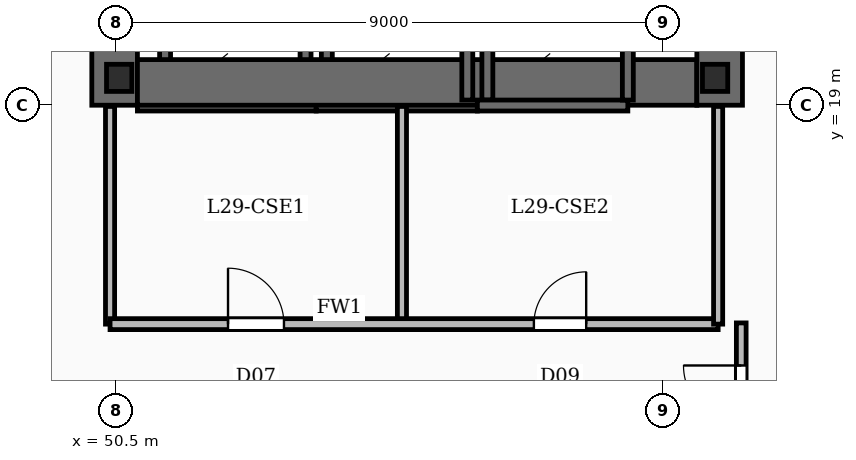
"""IFC4 building model, lengths in metres.
Left out: names, types, materials, properties, quantities, classifications, styles, units other than length and angle.
Written with IfcOpenShell. Run it as: python <this file> out.ifc"""

import sys

from ifc_helpers import new_model, si_unit, direction, frame, frame_2d, origin, origin_2d, place, context, subcontext, project, spatial, rectangle, i_section, extrude, element, fill, save


model = new_model("IFC4")
c1 = context("Model", 3, precision=1e-05, world=origin(), true_north=direction((0.0, 1.0)))
c2 = subcontext(c1, "Body", "Model", "MODEL_VIEW")
j1 = project(units=[si_unit("LENGTHUNIT", "METRE"), si_unit("PLANEANGLEUNIT", "RADIAN")], contexts=[c1])
p1 = place(None, origin())
s1 = spatial("IfcSite", under=j1, at=p1, CompositionType="ELEMENT")
p2 = place(p1, origin())
s2 = spatial("IfcBuilding", under=s1, at=p2, CompositionType="ELEMENT")
p3 = place(p2, frame((0.0, 0.0, 125.95)))
s3 = spatial("IfcBuildingStorey", under=s2, at=p3, CompositionType="ELEMENT", Elevation=125.95)
p4 = place(p3, frame((50.475, 19.0, -0.31), z_axis=(0.0, 0.0, 1.0), x_axis=(0.0, 1.0, 0.0)))
e1 = element("IfcWall", 1, at=p4, inside=s3, PredefinedType="SHEAR", context=c2, shape_type="SweptSolid", body=[
    extrude(rectangle(XDim=20.8, YDim=0.75, at=frame_2d((10.4, 0.0))), origin(), (0.0, 0.0, 1.0), 4.84),
])
p5 = place(p4, frame((2.5, 0.0, 0.31)))
e2 = element("IfcOpeningElement", 2, at=p5, cuts=e1, PredefinedType="OPENING", context=c2, shape_type="SweptSolid", body=[
    extrude(rectangle(XDim=1.05, YDim=2.15, at=frame_2d((0.525, 1.075))), frame((0.0, 0.385, 0.0), z_axis=(0.0, -1.0, 0.0), x_axis=(1.0, 0.0, 0.0)), (0.0, 0.0, 1.0), 0.77),
])
p6 = place(p4, frame((8.65, 0.0, 0.31)))
e3 = element("IfcOpeningElement", 3, at=p6, cuts=e1, PredefinedType="OPENING", context=c2, shape_type="SweptSolid", body=[
    extrude(rectangle(XDim=1.05, YDim=2.15, at=frame_2d((0.525, 1.075))), frame((0.0, 0.385, 0.0), z_axis=(0.0, -1.0, 0.0), x_axis=(1.0, 0.0, 0.0)), (0.0, 0.0, 1.0), 0.77),
])
p7 = place(p4, frame((14.62, 0.0, 0.31)))
e4 = element("IfcOpeningElement", 4, at=p7, cuts=e1, PredefinedType="OPENING", context=c2, shape_type="SweptSolid", body=[
    extrude(rectangle(XDim=1.1, YDim=2.15, at=frame_2d((0.55, 1.075))), frame((0.0, 0.385, 0.0), z_axis=(0.0, -1.0, 0.0), x_axis=(1.0, 0.0, 0.0)), (0.0, 0.0, 1.0), 0.77),
])
p8 = place(p3, frame((60.425, 19.0, -0.31), z_axis=(0.0, 0.0, 1.0), x_axis=(0.0, 1.0, 0.0)))
e5 = element("IfcWall", 5, at=p8, inside=s3, PredefinedType="SHEAR", context=c2, shape_type="SweptSolid", body=[
    extrude(rectangle(XDim=20.8, YDim=0.75, at=frame_2d((10.4, 0.0))), origin(), (0.0, 0.0, 1.0), 4.84),
])
p9 = place(p3, frame((50.85, 19.375, -0.31), z_axis=(0.0, 0.0, 1.0), x_axis=(1.0, 0.0, 0.0)))
e6 = element("IfcWall", 6, at=p9, inside=s3, PredefinedType="SHEAR", context=c2, shape_type="SweptSolid", body=[
    extrude(rectangle(XDim=9.2, YDim=0.75, at=frame_2d((4.6, 0.0))), origin(), (0.0, 0.0, 1.0), 4.84),
])
for number, where, z_axis, x_axis in (
    (7, (50.55, 19.45, -0.31), (0.0, 0.0, 1.0), (1.0, 0.0, 0.0)),
    (8, (60.35, 19.45, -0.31), (0.0, 0.0, 1.0), (1.0, 0.0, 0.0)),
):
    element("IfcColumn", number, at=place(p3, frame(where, z_axis=z_axis, x_axis=x_axis)), inside=s3, PredefinedType="COLUMN", context=c2, shape_type="SweptSolid", body=[
        extrude(i_section(OverallWidth=0.416, OverallDepth=0.446, WebThickness=0.039, FlangeThickness=0.063, FilletRadius=0.02, at=origin_2d()), origin(), (0.0, 0.0, 1.0), 4.84),
    ])
p10 = place(p3, frame((50.85, 18.995, 0.0), z_axis=(0.0, 0.0, 1.0), x_axis=(1.0, 0.0, 0.0)))
e9 = element("IfcWall", 9, at=p10, inside=s3, PredefinedType="SOLIDWALL", context=c2, shape_type="SweptSolid", body=[
    extrude(rectangle(XDim=2.94, YDim=0.18, at=frame_2d((1.47, 0.0))), origin(), (0.0, 0.0, 1.0), 4.53),
])
for number, where, z_axis, x_axis in (
    (10, (51.305, 19.085, 0.0), (0.0, 0.0, 1.0), (0.0, 1.0, 0.0)),
    (11, (53.615, 19.085, 0.0), (0.0, 0.0, 1.0), (0.0, 1.0, 0.0)),
):
    element("IfcWall", number, at=place(p3, frame(where, z_axis=z_axis, x_axis=x_axis)), inside=s3, PredefinedType="SOLIDWALL", context=c2, shape_type="SweptSolid", body=[
        extrude(rectangle(XDim=1.73, YDim=0.18, at=frame_2d((0.865, 0.0))), origin(), (0.0, 0.0, 1.0), 4.53),
    ])
p11 = place(p3, frame((53.79, 18.995, 0.0), z_axis=(0.0, 0.0, 1.0), x_axis=(1.0, 0.0, 0.0)))
e12 = element("IfcWall", 12, at=p11, inside=s3, PredefinedType="SOLIDWALL", context=c2, shape_type="SweptSolid", body=[
    extrude(rectangle(XDim=2.65, YDim=0.18, at=frame_2d((1.325, 0.0))), origin(), (0.0, 0.0, 1.0), 4.53),
])
for number, where, z_axis, x_axis in (
    (13, (53.965, 19.085, 0.0), (0.0, 0.0, 1.0), (0.0, 1.0, 0.0)),
    (14, (56.275, 19.085, 0.0), (0.0, 0.0, 1.0), (0.0, 1.0, 0.0)),
):
    element("IfcWall", number, at=place(p3, frame(where, z_axis=z_axis, x_axis=x_axis)), inside=s3, PredefinedType="SOLIDWALL", context=c2, shape_type="SweptSolid", body=[
        extrude(rectangle(XDim=1.73, YDim=0.18, at=frame_2d((0.865, 0.0))), origin(), (0.0, 0.0, 1.0), 4.53),
    ])
p12 = place(p3, frame((56.44, 18.995, 0.0), z_axis=(0.0, 0.0, 1.0), x_axis=(1.0, 0.0, 0.0)))
e15 = element("IfcWall", 15, at=p12, inside=s3, PredefinedType="SOLIDWALL", context=c2, shape_type="SweptSolid", body=[
    extrude(rectangle(XDim=2.475, YDim=0.18, at=frame_2d((1.238, 0.0))), origin(), (0.0, 0.0, 1.0), 4.53),
])
for number, where, z_axis, x_axis in (
    (16, (56.605, 19.085, 0.0), (0.0, 0.0, 1.0), (0.0, 1.0, 0.0)),
    (17, (58.915, 19.085, 0.0), (0.0, 0.0, 1.0), (0.0, 1.0, 0.0)),
):
    element("IfcWall", number, at=place(p3, frame(where, z_axis=z_axis, x_axis=x_axis)), inside=s3, PredefinedType="SOLIDWALL", context=c2, shape_type="SweptSolid", body=[
        extrude(rectangle(XDim=1.73, YDim=0.18, at=frame_2d((0.865, 0.0))), origin(), (0.0, 0.0, 1.0), 4.53),
    ])
p13 = place(p3, frame((55.2, 15.4, 0.0), z_axis=(0.0, 0.0, 1.0), x_axis=(0.0, 1.0, 0.0)))
e18 = element("IfcWall", 18, at=p13, inside=s3, PredefinedType="PARTITIONING", context=c2, shape_type="SweptSolid", body=[
    extrude(rectangle(XDim=3.58, YDim=0.15, at=frame_2d((1.79, 0.0))), origin(), (0.0, 0.0, 1.0), 3.59),
])
p14 = place(p3, frame((50.4, 15.4, 0.0), z_axis=(0.0, 0.0, 1.0), x_axis=(1.0, 0.0, 0.0)))
e19 = element("IfcWall", 19, at=p14, inside=s3, PredefinedType="SOLIDWALL", context=c2, shape_type="SweptSolid", body=[
    extrude(rectangle(XDim=10.0, YDim=0.18, at=frame_2d((5.0, 0.0))), origin(), (0.0, 0.0, 1.0), 3.59),
])
p15 = place(p14, frame((1.94, 0.0, 0.0)))
e20 = element("IfcOpeningElement", 20, at=p15, cuts=e19, PredefinedType="OPENING", context=c2, shape_type="SweptSolid", body=[
    extrude(rectangle(XDim=0.92, YDim=2.1, at=frame_2d((0.46, 1.05))), frame((0.0, 0.1, 0.0), z_axis=(0.0, -1.0, 0.0), x_axis=(1.0, 0.0, 0.0)), (0.0, 0.0, 1.0), 0.2),
])
p16 = place(p14, frame((6.97, 0.0, 0.0)))
e21 = element("IfcOpeningElement", 21, at=p16, cuts=e19, PredefinedType="OPENING", context=c2, shape_type="SweptSolid", body=[
    extrude(rectangle(XDim=0.86, YDim=2.05, at=frame_2d((0.43, 1.025))), frame((0.0, 0.1, 0.0), z_axis=(0.0, -1.0, 0.0), x_axis=(1.0, 0.0, 0.0)), (0.0, 0.0, 1.0), 0.2),
])
for number, where, z_axis, x_axis in (
    (22, (50.4, 15.4, 0.0), (0.0, 0.0, 1.0), (0.0, 1.0, 0.0)),
    (23, (60.4, 15.4, 0.0), (0.0, 0.0, 1.0), (0.0, 1.0, 0.0)),
):
    element("IfcWall", number, at=place(p3, frame(where, z_axis=z_axis, x_axis=x_axis)), inside=s3, PredefinedType="PARTITIONING", context=c2, shape_type="SweptSolid", body=[
        extrude(rectangle(XDim=3.58, YDim=0.15, at=frame_2d((1.79, 0.0))), origin(), (0.0, 0.0, 1.0), 3.59),
    ])
p17 = place(p3, frame((60.78, 13.12, 0.0), z_axis=(0.0, 0.0, 1.0), x_axis=(0.0, 1.0, 0.0)))
e24 = element("IfcWall", 24, at=p17, inside=s3, PredefinedType="PARTITIONING", context=c2, shape_type="SweptSolid", body=[
    extrude(rectangle(XDim=2.3, YDim=0.16, at=frame_2d((1.15, 0.0))), origin(), (0.0, 0.0, 1.0), 3.59),
])
p18 = place(p17, frame((0.65, 0.0, 0.0)))
e25 = element("IfcOpeningElement", 25, at=p18, cuts=e24, PredefinedType="OPENING", context=c2, shape_type="SweptSolid", body=[
    extrude(rectangle(XDim=0.95, YDim=2.15, at=frame_2d((0.475, 1.075))), frame((0.0, 0.09, 0.0), z_axis=(0.0, -1.0, 0.0), x_axis=(1.0, 0.0, 0.0)), (0.0, 0.0, 1.0), 0.18),
])
p19 = place(p15, origin())
e26 = element("IfcDoor", 26, at=p19, inside=s3, OperationType="SINGLE_SWING_LEFT", PredefinedType="DOOR", context=c2, shape_type="SweptSolid", body=[
    extrude(rectangle(XDim=0.92, YDim=2.1, at=frame_2d((0.46, 1.05))), frame((0.0, 0.025, 0.0), z_axis=(0.0, -1.0, 0.0), x_axis=(1.0, 0.0, 0.0)), (0.0, 0.0, 1.0), 0.05),
])
fill(e20, e26)
p20 = place(p16, origin())
e27 = element("IfcDoor", 27, at=p20, inside=s3, OperationType="SINGLE_SWING_RIGHT", PredefinedType="DOOR", context=c2, shape_type="SweptSolid", body=[
    extrude(rectangle(XDim=0.86, YDim=2.05, at=frame_2d((0.43, 1.025))), frame((0.0, 0.025, 0.0), z_axis=(0.0, -1.0, 0.0), x_axis=(1.0, 0.0, 0.0)), (0.0, 0.0, 1.0), 0.05),
])
fill(e21, e27)
p21 = place(p18, origin())
e28 = element("IfcDoor", 28, at=p21, inside=s3, OperationType="SINGLE_SWING_RIGHT", PredefinedType="DOOR", context=c2, shape_type="SweptSolid", body=[
    extrude(rectangle(XDim=0.95, YDim=2.15, at=frame_2d((0.475, 1.075))), frame((0.0, 0.025, 0.0), z_axis=(0.0, -1.0, 0.0), x_axis=(1.0, 0.0, 0.0)), (0.0, 0.0, 1.0), 0.05),
])
fill(e25, e28)
save(model, sys.argv[1])
